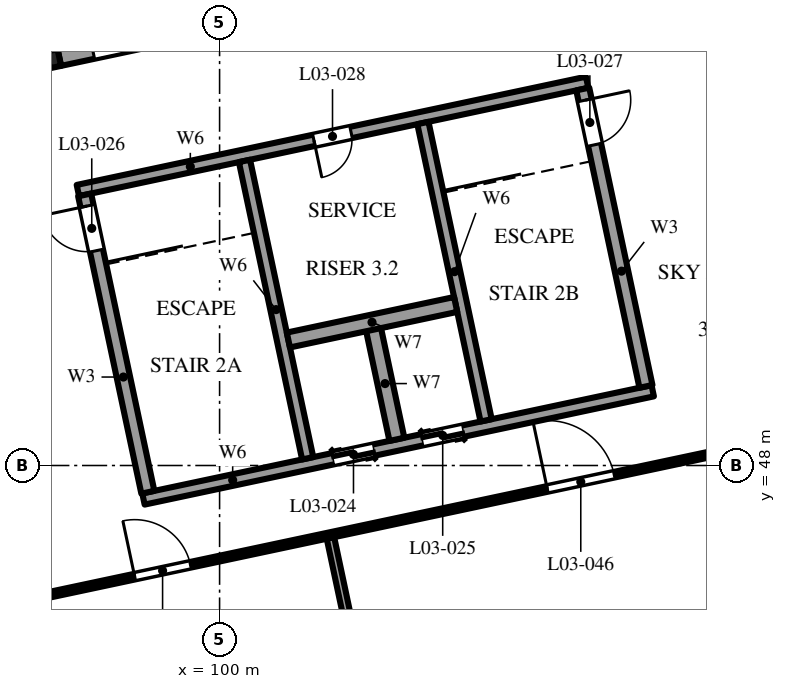
"""IFC4 building model, lengths in metres.
Left out: names, types, materials, properties, quantities, classifications, styles, units other than length and angle.
Written with IfcOpenShell. Run it as: python <this file> out.ifc"""

import sys

from ifc_helpers import new_model, si_unit, direction, frame, frame_2d, origin, origin_2d, place, context, subcontext, project, spatial, polyline, rectangle, i_section, outline, extrude, element, fill, save


model = new_model("IFC4")
c1 = context("Model", 3, precision=1e-05, world=origin(), true_north=direction((0.0, 1.0)))
c2 = subcontext(c1, "Body", "Model", "MODEL_VIEW")
j1 = project(units=[si_unit("LENGTHUNIT", "METRE"), si_unit("PLANEANGLEUNIT", "RADIAN")], contexts=[c1])
p1 = place(None, origin())
s1 = spatial("IfcSite", under=j1, at=p1, CompositionType="ELEMENT")
p2 = place(p1, origin())
s2 = spatial("IfcBuilding", under=s1, at=p2, CompositionType="ELEMENT")
p3 = place(p2, frame((0.0, 0.0, 16.8)))
s3 = spatial("IfcBuildingStorey", under=s2, at=p3, CompositionType="ELEMENT", Elevation=16.8)
p4 = place(p3, frame((95.636, 58.705, 0.0), z_axis=(0.0, 0.0, 1.0), x_axis=(0.978147600734, 0.207911690818, 0.0)))
e1 = element("IfcColumn", 1, at=p4, inside=s3, PredefinedType="COLUMN", context=c2, shape_type="SweptSolid", body=[
    extrude(i_section(OverallWidth=0.3, OverallDepth=0.45, WebThickness=0.014, FlangeThickness=0.026, FilletRadius=0.027, at=origin_2d()), origin(), (0.0, 0.0, 1.0), 4.8),
])
p5 = place(p3, frame((96.271, 55.236, 0.0), z_axis=(0.0, 0.0, 1.0), x_axis=(0.978147662755, 0.20791139903, 0.0)))
e2 = element("IfcWall", 2, at=p5, inside=s3, PredefinedType="SHEAR", context=c2, shape_type="SweptSolid", body=[
    extrude(outline(polyline([(0.0, 0.0), (13.7, 0.0), (13.7, 8.642), (0.0, 7.908), (0.0, 0.0)])), frame((0.0, 0.15, 0.0), z_axis=(0.0, -1.0, 0.0), x_axis=(1.0, 0.0, 0.0)), (0.0, 0.0, 1.0), 0.3),
])
p6 = place(p5, frame((6.35, 0.0, 0.0)))
e3 = element("IfcOpeningElement", 3, at=p6, cuts=e2, PredefinedType="OPENING", context=c2, shape_type="SweptSolid", body=[
    extrude(rectangle(XDim=1.0, YDim=2.1, at=frame_2d((0.5, 1.05))), frame((0.0, 0.16, 0.0), z_axis=(0.0, -1.0, 0.0), x_axis=(1.0, 0.0, 0.0)), (0.0, 0.0, 1.0), 0.32),
])
p7 = place(p3, frame((97.997, 47.118, 0.0), z_axis=(0.0, 0.0, 1.0), x_axis=(0.978147662755, 0.20791139903, 0.0)))
e4 = element("IfcWall", 4, at=p7, inside=s3, PredefinedType="SHEAR", context=c2, shape_type="SweptSolid", body=[
    extrude(outline(polyline([(0.0, 0.0), (13.7, 0.0), (13.7, 9.076), (0.0, 8.344), (0.0, 0.0)])), frame((0.0, 0.15, 0.0), z_axis=(0.0, -1.0, 0.0), x_axis=(1.0, 0.0, 0.0)), (0.0, 0.0, 1.0), 0.3),
])
p8 = place(p7, frame((5.1, 0.0, 0.0)))
e5 = element("IfcOpeningElement", 5, at=p8, cuts=e4, PredefinedType="OPENING", context=c2, shape_type="SweptSolid", body=[
    extrude(rectangle(XDim=1.1, YDim=2.1, at=frame_2d((0.55, 1.05))), frame((0.0, 0.16, 0.0), z_axis=(0.0, -1.0, 0.0), x_axis=(1.0, 0.0, 0.0)), (0.0, 0.0, 1.0), 0.32),
])
p9 = place(p7, frame((7.5, 0.0, 0.0)))
e6 = element("IfcOpeningElement", 6, at=p9, cuts=e4, PredefinedType="OPENING", context=c2, shape_type="SweptSolid", body=[
    extrude(rectangle(XDim=1.1, YDim=2.1, at=frame_2d((0.55, 1.05))), frame((0.0, 0.16, 0.0), z_axis=(0.0, -1.0, 0.0), x_axis=(1.0, 0.0, 0.0)), (0.0, 0.0, 1.0), 0.32),
])
p10 = place(p3, frame((96.449, 55.121, 0.0), z_axis=(0.0, 0.0, 1.0), x_axis=(0.207915693476, -0.978146749934, 0.0)))
e7 = element("IfcWall", 7, at=p10, inside=s3, PredefinedType="SOLIDWALL", context=c2, shape_type="SweptSolid", body=[
    extrude(outline(polyline([(0.0, 0.0), (8.0, 0.0), (8.0, 8.344), (0.0, 7.924), (0.0, 0.0)])), frame((0.0, 0.175, 0.0), z_axis=(0.0, -1.0, 0.0), x_axis=(1.0, 0.0, 0.0)), (0.0, 0.0, 1.0), 0.35),
])
p11 = place(p10, frame((0.3, 0.0, 0.0)))
e8 = element("IfcOpeningElement", 8, at=p11, cuts=e7, PredefinedType="OPENING", context=c2, shape_type="SweptSolid", body=[
    extrude(rectangle(XDim=1.2, YDim=2.1, at=frame_2d((0.6, 1.05))), frame((0.0, 0.185, 0.0), z_axis=(0.0, -1.0, 0.0), x_axis=(1.0, 0.0, 0.0)), (0.0, 0.0, 1.0), 0.37),
])
p12 = place(p3, frame((109.556, 57.907, 0.0), z_axis=(0.0, 0.0, 1.0), x_axis=(0.207915693476, -0.978146749934, 0.0)))
e9 = element("IfcWall", 9, at=p12, inside=s3, PredefinedType="SOLIDWALL", context=c2, shape_type="SweptSolid", body=[
    extrude(outline(polyline([(0.0, 0.0), (8.0, 0.0), (8.0, 9.061), (0.0, 8.641), (0.0, 0.0)])), frame((0.0, 0.175, 0.0), z_axis=(0.0, -1.0, 0.0), x_axis=(1.0, 0.0, 0.0)), (0.0, 0.0, 1.0), 0.35),
])
p13 = place(p12, frame((0.3, 0.0, 0.0)))
e10 = element("IfcOpeningElement", 10, at=p13, cuts=e9, PredefinedType="OPENING", context=c2, shape_type="SweptSolid", body=[
    extrude(rectangle(XDim=1.2, YDim=2.1, at=frame_2d((0.6, 1.05))), frame((0.0, 0.185, 0.0), z_axis=(0.0, -1.0, 0.0), x_axis=(1.0, 0.0, 0.0)), (0.0, 0.0, 1.0), 0.37),
])
p14 = place(p3, frame((100.655, 56.015, 0.0), z_axis=(0.0, 0.0, 1.0), x_axis=(0.207915693476, -0.978146749934, 0.0)))
e11 = element("IfcWall", 11, at=p14, inside=s3, PredefinedType="SHEAR", context=c2, shape_type="SweptSolid", body=[
    extrude(outline(polyline([(0.0, 0.0), (8.0, 0.0), (8.0, 8.574), (0.0, 8.155), (0.0, 0.0)])), frame((0.0, 0.15, 0.0), z_axis=(0.0, -1.0, 0.0), x_axis=(1.0, 0.0, 0.0)), (0.0, 0.0, 1.0), 0.3),
])
p15 = place(p3, frame((105.35, 57.013, 0.0), z_axis=(0.0, 0.0, 1.0), x_axis=(0.207915693476, -0.978146749934, 0.0)))
e12 = element("IfcWall", 12, at=p15, inside=s3, PredefinedType="SHEAR", context=c2, shape_type="SweptSolid", body=[
    extrude(outline(polyline([(0.0, 0.0), (8.0, 0.0), (8.0, 8.831), (0.0, 8.411), (0.0, 0.0)])), frame((0.0, 0.15, 0.0), z_axis=(0.0, -1.0, 0.0), x_axis=(1.0, 0.0, 0.0)), (0.0, 0.0, 1.0), 0.3),
])
p16 = place(p3, frame((104.042, 51.623, 0.0), z_axis=(0.0, 0.0, 1.0), x_axis=(0.207917150959, -0.978146440129, 0.0)))
e13 = element("IfcWall", 13, at=p16, inside=s3, PredefinedType="SHEAR", context=c2, shape_type="SweptSolid", body=[
    extrude(outline(polyline([(0.0, 0.0), (3.0, 0.0), (3.0, 8.702), (0.0, 8.545), (0.0, 0.0)])), frame((0.0, 0.2, 0.0), z_axis=(0.0, -1.0, 0.0), x_axis=(1.0, 0.0, 0.0)), (0.0, 0.0, 1.0), 0.4),
])
p17 = place(p3, frame((101.81, 51.302, 0.0), z_axis=(0.0, 0.0, 1.0), x_axis=(0.978138577198, 0.207954138688, 0.0)))
e14 = element("IfcWall", 14, at=p17, inside=s3, PredefinedType="SHEAR", context=c2, shape_type="SweptSolid", body=[
    extrude(outline(polyline([(0.0, 0.0), (4.5, 0.0), (4.5, 8.657), (0.0, 8.417), (0.0, 0.0)])), frame((0.0, 0.2, 0.0), z_axis=(0.0, -1.0, 0.0), x_axis=(1.0, 0.0, 0.0)), (0.0, 0.0, 1.0), 0.4),
])
p18 = place(p3, frame((95.783, 58.736, 0.0), z_axis=(0.0, 0.0, 1.0), x_axis=(0.978146440129, 0.207917150959, 0.0)))
e15 = element("IfcWall", 15, at=p18, inside=s3, PredefinedType="SOLIDWALL", context=c2, shape_type="SweptSolid", body=[
    extrude(outline(polyline([(0.0, 0.0), (4.2, 0.0), (4.2, 9.262), (0.0, 9.037), (0.0, 0.0)])), frame((0.0, 0.225, 0.0), z_axis=(0.0, -1.0, 0.0), x_axis=(1.0, 0.0, 0.0)), (0.0, 0.0, 1.0), 0.45),
])
p19 = place(p18, frame((0.9, 0.0, 0.45)))
e16 = element("IfcOpeningElement", 16, at=p19, cuts=e15, PredefinedType="OPENING", context=c2, shape_type="SweptSolid", body=[
    extrude(rectangle(XDim=2.4, YDim=3.3, at=frame_2d((1.2, 1.65))), frame((0.0, 0.235, 0.0), z_axis=(0.0, -1.0, 0.0), x_axis=(1.0, 0.0, 0.0)), (0.0, 0.0, 1.0), 0.47),
])
p20 = place(p3, frame((80.893, 41.489, 0.0), z_axis=(0.0, 0.0, 1.0), x_axis=(0.97814724207, 0.20791337819, 0.0)))
e17 = element("IfcWall", 17, at=p20, inside=s3, PredefinedType="PARTITIONING", context=c2, shape_type="SweptSolid", body=[
    extrude(outline(polyline([(0.0, 0.0), (49.5, 0.0), (49.5, 9.336), (0.0, 6.688), (0.0, 0.0)])), frame((0.0, 0.075, 0.0), z_axis=(0.0, -1.0, 0.0), x_axis=(1.0, 0.0, 0.0)), (0.0, 0.0, 1.0), 0.15),
])
p21 = place(p20, frame((5.85, 0.0, 0.0)))
e18 = element("IfcOpeningElement", 18, at=p21, cuts=e17, PredefinedType="OPENING", context=c2, shape_type="SweptSolid", body=[
    extrude(rectangle(XDim=1.8, YDim=2.1, at=frame_2d((0.9, 1.05))), frame((0.0, 0.085, 0.0), z_axis=(0.0, -1.0, 0.0), x_axis=(1.0, 0.0, 0.0)), (0.0, 0.0, 1.0), 0.17),
])
p22 = place(p20, frame((17.25, 0.0, 0.0)))
e19 = element("IfcOpeningElement", 19, at=p22, cuts=e17, PredefinedType="OPENING", context=c2, shape_type="SweptSolid", body=[
    extrude(rectangle(XDim=1.5, YDim=2.1, at=frame_2d((0.75, 1.05))), frame((0.0, 0.085, 0.0), z_axis=(0.0, -1.0, 0.0), x_axis=(1.0, 0.0, 0.0)), (0.0, 0.0, 1.0), 0.17),
])
p23 = place(p20, frame((28.35, 0.0, 0.0)))
e20 = element("IfcOpeningElement", 20, at=p23, cuts=e17, PredefinedType="OPENING", context=c2, shape_type="SweptSolid", body=[
    extrude(rectangle(XDim=1.8, YDim=2.1, at=frame_2d((0.9, 1.05))), frame((0.0, 0.085, 0.0), z_axis=(0.0, -1.0, 0.0), x_axis=(1.0, 0.0, 0.0)), (0.0, 0.0, 1.0), 0.17),
])
p24 = place(p20, frame((41.85, 0.0, 0.0)))
e21 = element("IfcOpeningElement", 21, at=p24, cuts=e17, PredefinedType="OPENING", context=c2, shape_type="SweptSolid", body=[
    extrude(rectangle(XDim=1.8, YDim=2.1, at=frame_2d((0.9, 1.05))), frame((0.0, 0.085, 0.0), z_axis=(0.0, -1.0, 0.0), x_axis=(1.0, 0.0, 0.0)), (0.0, 0.0, 1.0), 0.17),
])
p25 = place(p3, frame((96.177, 34.514, 0.0), z_axis=(0.0, 0.0, 1.0), x_axis=(-0.20790935802, 0.978148096582, 0.0)))
e22 = element("IfcWall", 22, at=p25, inside=s3, PredefinedType="PARTITIONING", context=c2, shape_type="SweptSolid", body=[
    extrude(outline(polyline([(0.0, 0.0), (9.925, 0.0), (9.925, 6.696), (0.0, 6.696), (0.0, 0.0)])), frame((0.0, 0.1, 0.0), z_axis=(0.0, -1.0, 0.0), x_axis=(1.0, 0.0, 0.0)), (0.0, 0.0, 1.0), 0.2),
])
p26 = place(p3, frame((104.981, 36.385, 0.0), z_axis=(0.0, 0.0, 1.0), x_axis=(-0.207927890391, 0.978144157268, 0.0)))
e23 = element("IfcWall", 23, at=p26, inside=s3, PredefinedType="PARTITIONING", context=c2, shape_type="SweptSolid", body=[
    extrude(outline(polyline([(0.0, 0.0), (9.925, 0.0), (9.925, 7.896), (0.0, 8.097), (0.0, 0.0)])), frame((0.0, 0.1, 0.0), z_axis=(0.0, -1.0, 0.0), x_axis=(1.0, 0.0, 0.0)), (0.0, 0.0, 1.0), 0.2),
])
p27 = place(p8, frame((1.1, 0.0, 0.0), z_axis=(0.0, 0.0, 1.0), x_axis=(-1.0, 0.0, 0.0)))
e24 = element("IfcDoor", 24, at=p27, inside=s3, OperationType="DOUBLE_DOOR_SLIDING", PredefinedType="DOOR", context=c2, shape_type="SweptSolid", body=[
    extrude(rectangle(XDim=1.1, YDim=2.1, at=frame_2d((0.55, 1.05))), frame((0.0, 0.025, 0.0), z_axis=(0.0, -1.0, 0.0), x_axis=(1.0, 0.0, 0.0)), (0.0, 0.0, 1.0), 0.05),
])
fill(e5, e24)
p28 = place(p9, frame((1.1, 0.0, 0.0), z_axis=(0.0, 0.0, 1.0), x_axis=(-1.0, 0.0, 0.0)))
e25 = element("IfcDoor", 25, at=p28, inside=s3, OperationType="DOUBLE_DOOR_SLIDING", PredefinedType="DOOR", context=c2, shape_type="SweptSolid", body=[
    extrude(rectangle(XDim=1.1, YDim=2.1, at=frame_2d((0.55, 1.05))), frame((0.0, 0.025, 0.0), z_axis=(0.0, -1.0, 0.0), x_axis=(1.0, 0.0, 0.0)), (0.0, 0.0, 1.0), 0.05),
])
fill(e6, e25)
p29 = place(p11, frame((1.2, 0.0, 0.0), z_axis=(0.0, 0.0, 1.0), x_axis=(-1.0, 0.0, 0.0)))
e26 = element("IfcDoor", 26, at=p29, inside=s3, OperationType="SINGLE_SWING_RIGHT", PredefinedType="DOOR", context=c2, shape_type="SweptSolid", body=[
    extrude(rectangle(XDim=1.2, YDim=2.1, at=frame_2d((0.6, 1.05))), frame((0.0, 0.025, 0.0), z_axis=(0.0, -1.0, 0.0), x_axis=(1.0, 0.0, 0.0)), (0.0, 0.0, 1.0), 0.05),
])
fill(e8, e26)
p30 = place(p13, origin())
e27 = element("IfcDoor", 27, at=p30, inside=s3, OperationType="SINGLE_SWING_RIGHT", PredefinedType="DOOR", context=c2, shape_type="SweptSolid", body=[
    extrude(rectangle(XDim=1.2, YDim=2.1, at=frame_2d((0.6, 1.05))), frame((0.0, 0.025, 0.0), z_axis=(0.0, -1.0, 0.0), x_axis=(1.0, 0.0, 0.0)), (0.0, 0.0, 1.0), 0.05),
])
fill(e10, e27)
p31 = place(p6, frame((1.0, 0.0, 0.0), z_axis=(0.0, 0.0, 1.0), x_axis=(-1.0, 0.0, 0.0)))
e28 = element("IfcDoor", 28, at=p31, inside=s3, OperationType="SINGLE_SWING_LEFT", PredefinedType="DOOR", context=c2, shape_type="SweptSolid", body=[
    extrude(rectangle(XDim=1.0, YDim=2.1, at=frame_2d((0.5, 1.05))), frame((0.0, 0.025, 0.0), z_axis=(0.0, -1.0, 0.0), x_axis=(1.0, 0.0, 0.0)), (0.0, 0.0, 1.0), 0.05),
])
fill(e3, e28)
p32 = place(p22, origin())
e29 = element("IfcDoor", 29, at=p32, inside=s3, OperationType="DOUBLE_DOOR_SINGLE_SWING", PredefinedType="DOOR", context=c2, shape_type="SweptSolid", body=[
    extrude(rectangle(XDim=1.5, YDim=2.1, at=frame_2d((0.75, 1.05))), frame((0.0, 0.025, 0.0), z_axis=(0.0, -1.0, 0.0), x_axis=(1.0, 0.0, 0.0)), (0.0, 0.0, 1.0), 0.05),
])
fill(e19, e29)
p33 = place(p23, origin())
e30 = element("IfcDoor", 30, at=p33, inside=s3, OperationType="DOUBLE_DOOR_SINGLE_SWING", PredefinedType="DOOR", context=c2, shape_type="SweptSolid", body=[
    extrude(rectangle(XDim=1.8, YDim=2.1, at=frame_2d((0.9, 1.05))), frame((0.0, 0.025, 0.0), z_axis=(0.0, -1.0, 0.0), x_axis=(1.0, 0.0, 0.0)), (0.0, 0.0, 1.0), 0.05),
])
fill(e20, e30)
save(model, sys.argv[1])
